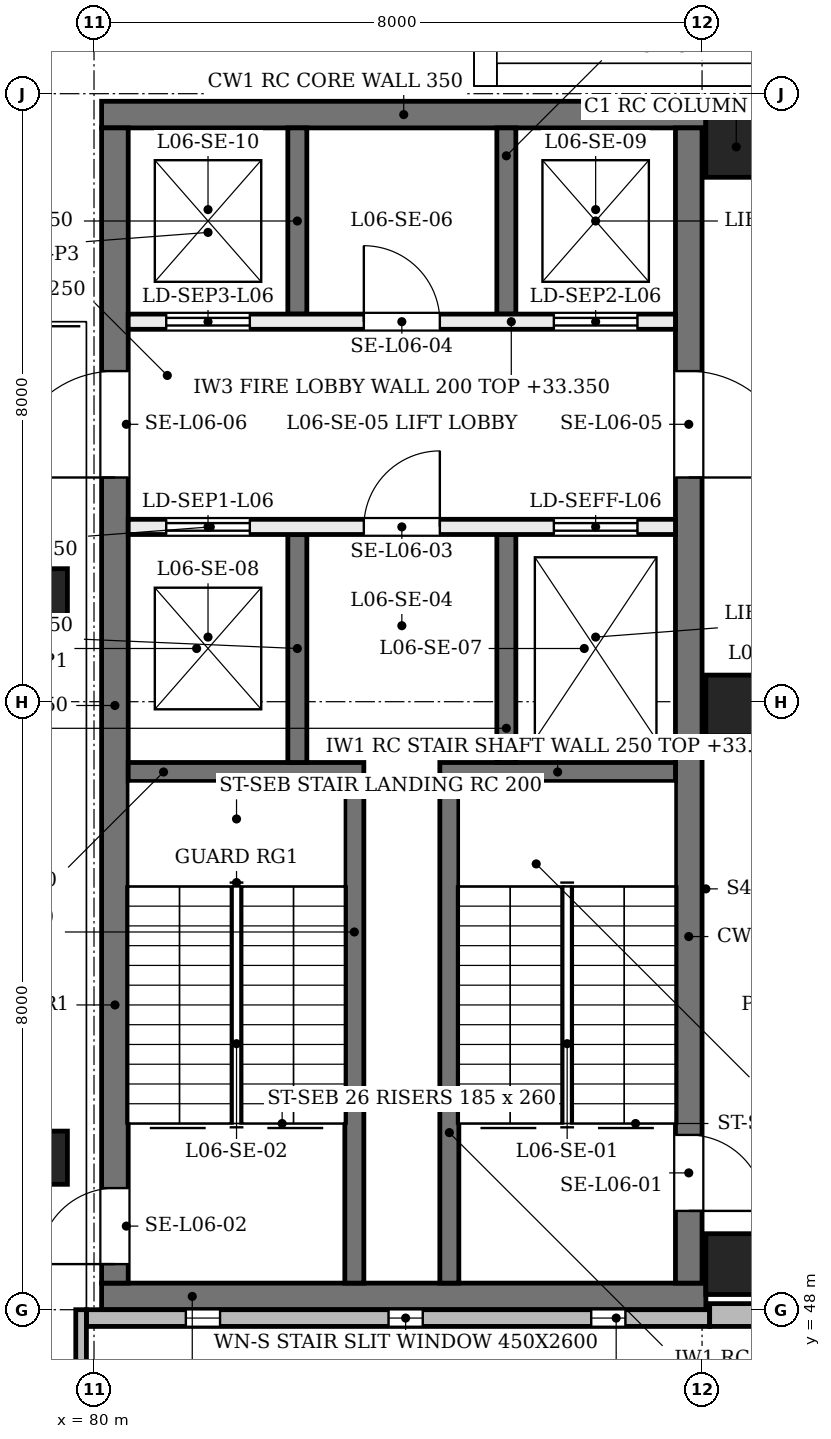
"""IFC4 building model, lengths in metres.
Left out: names, types, materials, properties, quantities, classifications, styles, units other than length and angle.
Written with IfcOpenShell. Run it as: python <this file> out.ifc"""

import sys

from ifc_helpers import new_model, si_unit, direction, frame, frame_2d, origin, origin_2d, place, context, subcontext, project, spatial, rectangle, extrude, element, fill, save


model = new_model("IFC4")
c1 = context("Model", 3, precision=1e-05, world=origin(), true_north=direction((0.0, 1.0)))
c2 = subcontext(c1, "Body", "Model", "MODEL_VIEW")
j1 = project(units=[si_unit("LENGTHUNIT", "METRE"), si_unit("PLANEANGLEUNIT", "RADIAN")], contexts=[c1])
p1 = place(None, origin())
s1 = spatial("IfcSite", under=j1, at=p1, CompositionType="ELEMENT")
p2 = place(p1, origin())
s2 = spatial("IfcBuilding", under=s1, at=p2, CompositionType="ELEMENT")
p3 = place(p2, frame((0.0, 0.0, 28.8)))
s3 = spatial("IfcBuildingStorey", under=s2, at=p3, CompositionType="ELEMENT", Elevation=28.8)
for number, where, z_axis, x_axis in (
    (1, (80.1, 48.175, 0.0), (0.0, 0.0, 1.0), (1.0, 0.0, 0.0)),
    (2, (80.1, 63.725, 0.0), (0.0, 0.0, 1.0), (1.0, 0.0, 0.0)),
):
    element("IfcWall", number, at=place(p3, frame(where, z_axis=z_axis, x_axis=x_axis)), inside=s3, PredefinedType="SHEAR", context=c2, shape_type="SweptSolid", body=[
        extrude(rectangle(XDim=7.95, YDim=0.35, at=frame_2d((3.975, 0.0))), origin(), (0.0, 0.0, 1.0), 4.58),
    ])
p4 = place(p3, frame((80.275, 48.35, 0.0), z_axis=(0.0, 0.0, 1.0), x_axis=(0.0, 1.0, 0.0)))
e3 = element("IfcWall", 3, at=p4, inside=s3, PredefinedType="SHEAR", context=c2, shape_type="SweptSolid", body=[
    extrude(rectangle(XDim=15.2, YDim=0.35, at=frame_2d((7.6, 0.0))), origin(), (0.0, 0.0, 1.0), 4.58),
])
p5 = place(p4, frame((0.25, 0.0, 0.0)))
e4 = element("IfcOpeningElement", 4, at=p5, cuts=e3, PredefinedType="OPENING", context=c2, shape_type="SweptSolid", body=[
    extrude(rectangle(XDim=1.0, YDim=2.1, at=frame_2d((0.5, 1.05))), frame((0.0, 0.185, 0.0), z_axis=(0.0, -1.0, 0.0), x_axis=(1.0, 0.0, 0.0)), (0.0, 0.0, 1.0), 0.37),
])
p6 = place(p4, frame((10.6, 0.0, 0.0)))
e5 = element("IfcOpeningElement", 5, at=p6, cuts=e3, PredefinedType="OPENING", context=c2, shape_type="SweptSolid", body=[
    extrude(rectangle(XDim=1.4, YDim=2.1, at=frame_2d((0.7, 1.05))), frame((0.0, 0.185, 0.0), z_axis=(0.0, -1.0, 0.0), x_axis=(1.0, 0.0, 0.0)), (0.0, 0.0, 1.0), 0.37),
])
p7 = place(p3, frame((87.825, 48.35, 0.0), z_axis=(0.0, 0.0, 1.0), x_axis=(0.0, 1.0, 0.0)))
e6 = element("IfcWall", 6, at=p7, inside=s3, PredefinedType="SHEAR", context=c2, shape_type="SweptSolid", body=[
    extrude(rectangle(XDim=15.2, YDim=0.35, at=frame_2d((7.6, 0.0))), origin(), (0.0, 0.0, 1.0), 4.58),
])
p8 = place(p7, frame((0.95, 0.0, 0.0)))
e7 = element("IfcOpeningElement", 7, at=p8, cuts=e6, PredefinedType="OPENING", context=c2, shape_type="SweptSolid", body=[
    extrude(rectangle(XDim=1.0, YDim=2.1, at=frame_2d((0.5, 1.05))), frame((0.0, 0.185, 0.0), z_axis=(0.0, -1.0, 0.0), x_axis=(1.0, 0.0, 0.0)), (0.0, 0.0, 1.0), 0.37),
])
p9 = place(p7, frame((10.6, 0.0, 0.0)))
e8 = element("IfcOpeningElement", 8, at=p9, cuts=e6, PredefinedType="OPENING", context=c2, shape_type="SweptSolid", body=[
    extrude(rectangle(XDim=1.4, YDim=2.1, at=frame_2d((0.7, 1.05))), frame((0.0, 0.185, 0.0), z_axis=(0.0, -1.0, 0.0), x_axis=(1.0, 0.0, 0.0)), (0.0, 0.0, 1.0), 0.37),
])
for number, where, z_axis, x_axis in (
    (9, (88.45, 48.6, 0.0), (0.0, 0.0, 1.0), (1.0, 0.0, 0.0)),
    (10, (88.45, 55.95, 0.0), (0.0, 0.0, 1.0), (1.0, 0.0, 0.0)),
    (11, (88.45, 63.3, 0.0), (0.0, 0.0, 1.0), (1.0, 0.0, 0.0)),
):
    element("IfcColumn", number, at=place(p3, frame(where, z_axis=z_axis, x_axis=x_axis)), inside=s3, PredefinedType="COLUMN", context=c2, shape_type="SweptSolid", body=[
        extrude(rectangle(XDim=0.8, YDim=0.8, at=origin_2d()), origin(), (0.0, 0.0, 1.0), 4.58),
    ])
for number, where, z_axis, x_axis in (
    (12, (79.3, 50.0, 0.0), (0.0, 0.0, 1.0), (1.0, 0.0, 0.0)),
    (13, (79.3, 57.4, 0.0), (0.0, 0.0, 1.0), (1.0, 0.0, 0.0)),
):
    element("IfcColumn", number, at=place(p3, frame(where, z_axis=z_axis, x_axis=x_axis)), inside=s3, PredefinedType="COLUMN", context=c2, shape_type="SweptSolid", body=[
        extrude(rectangle(XDim=0.7, YDim=0.7, at=origin_2d()), origin(), (0.0, 0.0, 1.0), 4.58),
    ])
p10 = place(p3, frame((79.9, 47.89, 0.0), z_axis=(0.0, 0.0, 1.0), x_axis=(1.0, 0.0, 0.0)))
e14 = element("IfcWall", 14, at=p10, inside=s3, PredefinedType="SOLIDWALL", context=c2, shape_type="SweptSolid", body=[
    extrude(rectangle(XDim=8.2, YDim=0.22, at=frame_2d((4.1, 0.0))), origin(), (0.0, 0.0, 1.0), 3.9),
])
p11 = place(p10, frame((1.308, 0.0, 0.9)))
e15 = element("IfcOpeningElement", 15, at=p11, cuts=e14, PredefinedType="OPENING", context=c2, shape_type="SweptSolid", body=[
    extrude(rectangle(XDim=0.45, YDim=2.6, at=frame_2d((0.225, 1.3))), frame((0.0, 0.12, 0.0), z_axis=(0.0, -1.0, 0.0), x_axis=(1.0, 0.0, 0.0)), (0.0, 0.0, 1.0), 0.24),
])
p12 = place(p10, frame((3.975, 0.0, 0.9)))
e16 = element("IfcOpeningElement", 16, at=p12, cuts=e14, PredefinedType="OPENING", context=c2, shape_type="SweptSolid", body=[
    extrude(rectangle(XDim=0.45, YDim=2.6, at=frame_2d((0.225, 1.3))), frame((0.0, 0.12, 0.0), z_axis=(0.0, -1.0, 0.0), x_axis=(1.0, 0.0, 0.0)), (0.0, 0.0, 1.0), 0.24),
])
p13 = place(p10, frame((6.642, 0.0, 0.9)))
e17 = element("IfcOpeningElement", 17, at=p13, cuts=e14, PredefinedType="OPENING", context=c2, shape_type="SweptSolid", body=[
    extrude(rectangle(XDim=0.45, YDim=2.6, at=frame_2d((0.225, 1.3))), frame((0.0, 0.12, 0.0), z_axis=(0.0, -1.0, 0.0), x_axis=(1.0, 0.0, 0.0)), (0.0, 0.0, 1.0), 0.24),
])
p14 = place(p3, frame((88.1, 47.93, 0.0), z_axis=(0.0, 0.0, 1.0), x_axis=(1.0, 0.0, 0.0)))
e18 = element("IfcWall", 18, at=p14, inside=s3, PredefinedType="SOLIDWALL", context=c2, shape_type="SweptSolid", body=[
    extrude(rectangle(XDim=7.9, YDim=0.3, at=frame_2d((3.95, 0.0))), origin(), (0.0, 0.0, 1.0), 3.9),
])
p15 = place(p14, frame((0.717, 0.0, 1.0)))
e19 = element("IfcOpeningElement", 19, at=p15, cuts=e18, PredefinedType="OPENING", context=c2, shape_type="SweptSolid", body=[
    extrude(rectangle(XDim=1.2, YDim=2.4, at=frame_2d((0.6, 1.2))), frame((0.0, 0.16, 0.0), z_axis=(0.0, -1.0, 0.0), x_axis=(1.0, 0.0, 0.0)), (0.0, 0.0, 1.0), 0.32),
])
p16 = place(p14, frame((3.35, 0.0, 1.0)))
e20 = element("IfcOpeningElement", 20, at=p16, cuts=e18, PredefinedType="OPENING", context=c2, shape_type="SweptSolid", body=[
    extrude(rectangle(XDim=1.2, YDim=2.4, at=frame_2d((0.6, 1.2))), frame((0.0, 0.16, 0.0), z_axis=(0.0, -1.0, 0.0), x_axis=(1.0, 0.0, 0.0)), (0.0, 0.0, 1.0), 0.32),
])
p17 = place(p14, frame((5.983, 0.0, 1.0)))
e21 = element("IfcOpeningElement", 21, at=p17, cuts=e18, PredefinedType="OPENING", context=c2, shape_type="SweptSolid", body=[
    extrude(rectangle(XDim=1.2, YDim=2.4, at=frame_2d((0.6, 1.2))), frame((0.0, 0.16, 0.0), z_axis=(0.0, -1.0, 0.0), x_axis=(1.0, 0.0, 0.0)), (0.0, 0.0, 1.0), 0.32),
])
p18 = place(p3, frame((79.83, 42.0, 0.0), z_axis=(0.0, 0.0, 1.0), x_axis=(0.0, 1.0, 0.0)))
e22 = element("IfcWall", 22, at=p18, inside=s3, PredefinedType="SOLIDWALL", context=c2, shape_type="SweptSolid", body=[
    extrude(rectangle(XDim=6.0, YDim=0.14, at=frame_2d((3.0, 0.0))), origin(), (0.0, 0.0, 1.0), 3.9),
])
p19 = place(p3, frame((85.15, 64.1, 0.0), z_axis=(0.0, 0.0, 1.0), x_axis=(0.0, 1.0, 0.0)))
e23 = element("IfcWall", 23, at=p19, inside=s3, PredefinedType="PARAPET", context=c2, shape_type="SweptSolid", body=[
    extrude(rectangle(XDim=31.8, YDim=0.3, at=frame_2d((15.9, 0.0))), origin(), (0.0, 0.0, 1.0), 1.1),
])
p20 = place(p3, frame((85.3, 64.25, 0.0), z_axis=(0.0, 0.0, 1.0), x_axis=(1.0, 0.0, 0.0)))
e24 = element("IfcWall", 24, at=p20, inside=s3, PredefinedType="PARAPET", context=c2, shape_type="SweptSolid", body=[
    extrude(rectangle(XDim=15.4, YDim=0.3, at=frame_2d((7.7, 0.0))), origin(), (0.0, 0.0, 1.0), 1.1),
])
for number, where, z_axis, x_axis in (
    (25, (84.675, 48.35, 0.0), (0.0, 0.0, 1.0), (0.0, 1.0, 0.0)),
    (26, (83.425, 48.35, 0.0), (0.0, 0.0, 1.0), (0.0, 1.0, 0.0)),
):
    element("IfcWall", number, at=place(p3, frame(where, z_axis=z_axis, x_axis=x_axis)), inside=s3, PredefinedType="SOLIDWALL", context=c2, shape_type="SweptSolid", body=[
        extrude(rectangle(XDim=6.6, YDim=0.25, at=frame_2d((3.3, 0.0))), origin(), (0.0, 0.0, 1.0), 4.55),
    ])
p21 = place(p3, frame((87.65, 55.075, 0.0), z_axis=(0.0, 0.0, 1.0), x_axis=(-1.0, 0.0, 0.0)))
e27 = element("IfcWall", 27, at=p21, inside=s3, PredefinedType="SOLIDWALL", context=c2, shape_type="SweptSolid", body=[
    extrude(rectangle(XDim=3.1, YDim=0.25, at=frame_2d((1.55, 0.0))), origin(), (0.0, 0.0, 1.0), 4.55),
])
p22 = place(p3, frame((83.55, 55.075, 0.0), z_axis=(0.0, 0.0, 1.0), x_axis=(-1.0, 0.0, 0.0)))
e28 = element("IfcWall", 28, at=p22, inside=s3, PredefinedType="SOLIDWALL", context=c2, shape_type="SweptSolid", body=[
    extrude(rectangle(XDim=3.1, YDim=0.25, at=frame_2d((1.55, 0.0))), origin(), (0.0, 0.0, 1.0), 4.55),
])
p23 = place(p3, frame((85.425, 55.2, 0.0), z_axis=(0.0, 0.0, 1.0), x_axis=(0.0, 1.0, 0.0)))
e29 = element("IfcWall", 29, at=p23, inside=s3, PredefinedType="SOLIDWALL", context=c2, shape_type="SweptSolid", body=[
    extrude(rectangle(XDim=3.0, YDim=0.25, at=frame_2d((1.5, 0.0))), origin(), (0.0, 0.0, 1.0), 4.55),
])
p24 = place(p3, frame((85.425, 61.1, 0.0), z_axis=(0.0, 0.0, 1.0), x_axis=(0.0, 1.0, 0.0)))
e30 = element("IfcWall", 30, at=p24, inside=s3, PredefinedType="SOLIDWALL", context=c2, shape_type="SweptSolid", body=[
    extrude(rectangle(XDim=2.45, YDim=0.25, at=frame_2d((1.225, 0.0))), origin(), (0.0, 0.0, 1.0), 4.55),
])
p25 = place(p3, frame((82.675, 55.2, 0.0), z_axis=(0.0, 0.0, 1.0), x_axis=(0.0, 1.0, 0.0)))
e31 = element("IfcWall", 31, at=p25, inside=s3, PredefinedType="SOLIDWALL", context=c2, shape_type="SweptSolid", body=[
    extrude(rectangle(XDim=3.0, YDim=0.25, at=frame_2d((1.5, 0.0))), origin(), (0.0, 0.0, 1.0), 4.55),
])
p26 = place(p3, frame((82.675, 61.1, 0.0), z_axis=(0.0, 0.0, 1.0), x_axis=(0.0, 1.0, 0.0)))
e32 = element("IfcWall", 32, at=p26, inside=s3, PredefinedType="SOLIDWALL", context=c2, shape_type="SweptSolid", body=[
    extrude(rectangle(XDim=2.45, YDim=0.25, at=frame_2d((1.225, 0.0))), origin(), (0.0, 0.0, 1.0), 4.55),
])
p27 = place(p3, frame((87.65, 58.3, 0.0), z_axis=(0.0, 0.0, 1.0), x_axis=(-1.0, 0.0, 0.0)))
e33 = element("IfcWall", 33, at=p27, inside=s3, PredefinedType="SOLIDWALL", context=c2, shape_type="SweptSolid", body=[
    extrude(rectangle(XDim=7.2, YDim=0.2, at=frame_2d((3.6, 0.0))), origin(), (0.0, 0.0, 1.0), 4.55),
])
p28 = place(p27, frame((0.5, 0.0, 0.0)))
e34 = element("IfcOpeningElement", 34, at=p28, cuts=e33, PredefinedType="OPENING", context=c2, shape_type="SweptSolid", body=[
    extrude(rectangle(XDim=1.1, YDim=2.1, at=frame_2d((0.55, 1.05))), frame((0.0, 0.11, 0.0), z_axis=(0.0, -1.0, 0.0), x_axis=(1.0, 0.0, 0.0)), (0.0, 0.0, 1.0), 0.22),
])
p29 = place(p27, frame((5.6, 0.0, 0.0)))
e35 = element("IfcOpeningElement", 35, at=p29, cuts=e33, PredefinedType="OPENING", context=c2, shape_type="SweptSolid", body=[
    extrude(rectangle(XDim=1.1, YDim=2.1, at=frame_2d((0.55, 1.05))), frame((0.0, 0.11, 0.0), z_axis=(0.0, -1.0, 0.0), x_axis=(1.0, 0.0, 0.0)), (0.0, 0.0, 1.0), 0.22),
])
p30 = place(p27, frame((3.1, 0.0, 0.0)))
e36 = element("IfcOpeningElement", 36, at=p30, cuts=e33, PredefinedType="OPENING", context=c2, shape_type="SweptSolid", body=[
    extrude(rectangle(XDim=1.0, YDim=2.1, at=frame_2d((0.5, 1.05))), frame((0.0, 0.11, 0.0), z_axis=(0.0, -1.0, 0.0), x_axis=(1.0, 0.0, 0.0)), (0.0, 0.0, 1.0), 0.22),
])
p31 = place(p3, frame((87.65, 61.0, 0.0), z_axis=(0.0, 0.0, 1.0), x_axis=(-1.0, 0.0, 0.0)))
e37 = element("IfcWall", 37, at=p31, inside=s3, PredefinedType="SOLIDWALL", context=c2, shape_type="SweptSolid", body=[
    extrude(rectangle(XDim=7.2, YDim=0.2, at=frame_2d((3.6, 0.0))), origin(), (0.0, 0.0, 1.0), 4.55),
])
p32 = place(p31, frame((0.5, 0.0, 0.0)))
e38 = element("IfcOpeningElement", 38, at=p32, cuts=e37, PredefinedType="OPENING", context=c2, shape_type="SweptSolid", body=[
    extrude(rectangle(XDim=1.1, YDim=2.1, at=frame_2d((0.55, 1.05))), frame((0.0, 0.11, 0.0), z_axis=(0.0, -1.0, 0.0), x_axis=(1.0, 0.0, 0.0)), (0.0, 0.0, 1.0), 0.22),
])
p33 = place(p31, frame((5.6, 0.0, 0.0)))
e39 = element("IfcOpeningElement", 39, at=p33, cuts=e37, PredefinedType="OPENING", context=c2, shape_type="SweptSolid", body=[
    extrude(rectangle(XDim=1.1, YDim=2.1, at=frame_2d((0.55, 1.05))), frame((0.0, 0.11, 0.0), z_axis=(0.0, -1.0, 0.0), x_axis=(1.0, 0.0, 0.0)), (0.0, 0.0, 1.0), 0.22),
])
p34 = place(p31, frame((3.1, 0.0, 0.0)))
e40 = element("IfcOpeningElement", 40, at=p34, cuts=e37, PredefinedType="OPENING", context=c2, shape_type="SweptSolid", body=[
    extrude(rectangle(XDim=1.0, YDim=2.1, at=frame_2d((0.5, 1.05))), frame((0.0, 0.11, 0.0), z_axis=(0.0, -1.0, 0.0), x_axis=(1.0, 0.0, 0.0)), (0.0, 0.0, 1.0), 0.22),
])
p35 = place(p11, origin())
e41 = element("IfcWindow", 41, at=p35, inside=s3, PartitioningType="SINGLE_PANEL", PredefinedType="WINDOW", context=c2, shape_type="SweptSolid", body=[
    extrude(rectangle(XDim=0.45, YDim=2.6, at=frame_2d((0.225, 1.3))), frame((0.0, 0.03, 0.0), z_axis=(0.0, -1.0, 0.0), x_axis=(1.0, 0.0, 0.0)), (0.0, 0.0, 1.0), 0.06),
])
fill(e15, e41)
p36 = place(p12, origin())
e42 = element("IfcWindow", 42, at=p36, inside=s3, PartitioningType="SINGLE_PANEL", PredefinedType="WINDOW", context=c2, shape_type="SweptSolid", body=[
    extrude(rectangle(XDim=0.45, YDim=2.6, at=frame_2d((0.225, 1.3))), frame((0.0, 0.03, 0.0), z_axis=(0.0, -1.0, 0.0), x_axis=(1.0, 0.0, 0.0)), (0.0, 0.0, 1.0), 0.06),
])
fill(e16, e42)
p37 = place(p13, origin())
e43 = element("IfcWindow", 43, at=p37, inside=s3, PartitioningType="SINGLE_PANEL", PredefinedType="WINDOW", context=c2, shape_type="SweptSolid", body=[
    extrude(rectangle(XDim=0.45, YDim=2.6, at=frame_2d((0.225, 1.3))), frame((0.0, 0.03, 0.0), z_axis=(0.0, -1.0, 0.0), x_axis=(1.0, 0.0, 0.0)), (0.0, 0.0, 1.0), 0.06),
])
fill(e17, e43)
p38 = place(p8, frame((1.0, 0.0, 0.0), z_axis=(0.0, 0.0, 1.0), x_axis=(-1.0, 0.0, 0.0)))
e44 = element("IfcDoor", 44, at=p38, inside=s3, OperationType="SINGLE_SWING_LEFT", PredefinedType="DOOR", context=c2, shape_type="SweptSolid", body=[
    extrude(rectangle(XDim=1.0, YDim=2.1, at=frame_2d((0.5, 1.05))), frame((0.0, 0.025, 0.0), z_axis=(0.0, -1.0, 0.0), x_axis=(1.0, 0.0, 0.0)), (0.0, 0.0, 1.0), 0.05),
])
fill(e7, e44)
p39 = place(p5, origin())
e45 = element("IfcDoor", 45, at=p39, inside=s3, OperationType="SINGLE_SWING_LEFT", PredefinedType="DOOR", context=c2, shape_type="SweptSolid", body=[
    extrude(rectangle(XDim=1.0, YDim=2.1, at=frame_2d((0.5, 1.05))), frame((0.0, 0.025, 0.0), z_axis=(0.0, -1.0, 0.0), x_axis=(1.0, 0.0, 0.0)), (0.0, 0.0, 1.0), 0.05),
])
fill(e4, e45)
p40 = place(p28, frame((1.1, 0.0, 0.0), z_axis=(0.0, 0.0, 1.0), x_axis=(-1.0, 0.0, 0.0)))
e46 = element("IfcDoor", 46, at=p40, inside=s3, OperationType="DOUBLE_DOOR_SLIDING", PredefinedType="DOOR", context=c2, shape_type="SweptSolid", body=[
    extrude(rectangle(XDim=1.1, YDim=2.1, at=frame_2d((0.55, 1.05))), frame((0.0, 0.025, 0.0), z_axis=(0.0, -1.0, 0.0), x_axis=(1.0, 0.0, 0.0)), (0.0, 0.0, 1.0), 0.05),
])
fill(e34, e46)
p41 = place(p29, frame((1.1, 0.0, 0.0), z_axis=(0.0, 0.0, 1.0), x_axis=(-1.0, 0.0, 0.0)))
e47 = element("IfcDoor", 47, at=p41, inside=s3, OperationType="DOUBLE_DOOR_SLIDING", PredefinedType="DOOR", context=c2, shape_type="SweptSolid", body=[
    extrude(rectangle(XDim=1.1, YDim=2.1, at=frame_2d((0.55, 1.05))), frame((0.0, 0.025, 0.0), z_axis=(0.0, -1.0, 0.0), x_axis=(1.0, 0.0, 0.0)), (0.0, 0.0, 1.0), 0.05),
])
fill(e35, e47)
p42 = place(p32, origin())
e48 = element("IfcDoor", 48, at=p42, inside=s3, OperationType="DOUBLE_DOOR_SLIDING", PredefinedType="DOOR", context=c2, shape_type="SweptSolid", body=[
    extrude(rectangle(XDim=1.1, YDim=2.1, at=frame_2d((0.55, 1.05))), frame((0.0, 0.025, 0.0), z_axis=(0.0, -1.0, 0.0), x_axis=(1.0, 0.0, 0.0)), (0.0, 0.0, 1.0), 0.05),
])
fill(e38, e48)
p43 = place(p33, origin())
e49 = element("IfcDoor", 49, at=p43, inside=s3, OperationType="DOUBLE_DOOR_SLIDING", PredefinedType="DOOR", context=c2, shape_type="SweptSolid", body=[
    extrude(rectangle(XDim=1.1, YDim=2.1, at=frame_2d((0.55, 1.05))), frame((0.0, 0.025, 0.0), z_axis=(0.0, -1.0, 0.0), x_axis=(1.0, 0.0, 0.0)), (0.0, 0.0, 1.0), 0.05),
])
fill(e39, e49)
p44 = place(p30, frame((1.0, 0.0, 0.0), z_axis=(0.0, 0.0, 1.0), x_axis=(-1.0, 0.0, 0.0)))
e50 = element("IfcDoor", 50, at=p44, inside=s3, OperationType="SINGLE_SWING_LEFT", PredefinedType="DOOR", context=c2, shape_type="SweptSolid", body=[
    extrude(rectangle(XDim=1.0, YDim=2.1, at=frame_2d((0.5, 1.05))), frame((0.0, 0.025, 0.0), z_axis=(0.0, -1.0, 0.0), x_axis=(1.0, 0.0, 0.0)), (0.0, 0.0, 1.0), 0.05),
])
fill(e36, e50)
p45 = place(p34, origin())
e51 = element("IfcDoor", 51, at=p45, inside=s3, OperationType="SINGLE_SWING_RIGHT", PredefinedType="DOOR", context=c2, shape_type="SweptSolid", body=[
    extrude(rectangle(XDim=1.0, YDim=2.1, at=frame_2d((0.5, 1.05))), frame((0.0, 0.025, 0.0), z_axis=(0.0, -1.0, 0.0), x_axis=(1.0, 0.0, 0.0)), (0.0, 0.0, 1.0), 0.05),
])
fill(e40, e51)
p46 = place(p9, frame((1.4, 0.0, 0.0), z_axis=(0.0, 0.0, 1.0), x_axis=(-1.0, 0.0, 0.0)))
e52 = element("IfcDoor", 52, at=p46, inside=s3, OperationType="SINGLE_SWING_LEFT", PredefinedType="DOOR", context=c2, shape_type="SweptSolid", body=[
    extrude(rectangle(XDim=1.4, YDim=2.1, at=frame_2d((0.7, 1.05))), frame((0.0, 0.025, 0.0), z_axis=(0.0, -1.0, 0.0), x_axis=(1.0, 0.0, 0.0)), (0.0, 0.0, 1.0), 0.05),
])
fill(e8, e52)
p47 = place(p6, origin())
e53 = element("IfcDoor", 53, at=p47, inside=s3, OperationType="SINGLE_SWING_LEFT", PredefinedType="DOOR", context=c2, shape_type="SweptSolid", body=[
    extrude(rectangle(XDim=1.4, YDim=2.1, at=frame_2d((0.7, 1.05))), frame((0.0, 0.025, 0.0), z_axis=(0.0, -1.0, 0.0), x_axis=(1.0, 0.0, 0.0)), (0.0, 0.0, 1.0), 0.05),
])
fill(e5, e53)
save(model, sys.argv[1])
